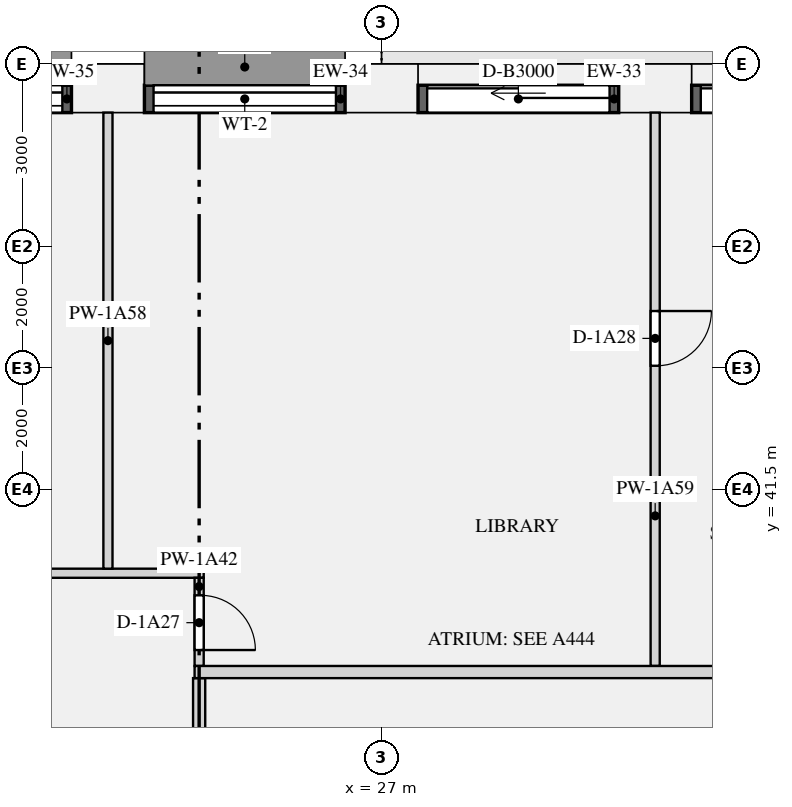
"""IFC4 building model, lengths in metres.
Left out: names, types, materials, properties, quantities, classifications, styles, units other than length and angle.
Written with IfcOpenShell. Run it as: python <this file> out.ifc"""

import sys

from ifc_helpers import new_model, si_unit, direction, frame, frame_2d, origin, origin_2d, place, context, subcontext, project, spatial, rectangle, extrude, element, fill, save


model = new_model("IFC4")
c1 = context("Model", 3, precision=1e-05, world=origin(), true_north=direction((0.0, 1.0)))
c2 = subcontext(c1, "Body", "Model", "MODEL_VIEW")
j1 = project(units=[si_unit("LENGTHUNIT", "METRE"), si_unit("PLANEANGLEUNIT", "RADIAN")], contexts=[c1])
p1 = place(None, origin())
s1 = spatial("IfcSite", under=j1, at=p1, CompositionType="ELEMENT")
p2 = place(p1, origin())
s2 = spatial("IfcBuilding", under=s1, at=p2, CompositionType="ELEMENT")
p3 = place(p2, frame((0.0, 0.0, 19.5)))
s3 = spatial("IfcBuildingStorey", under=s2, at=p3, CompositionType="ELEMENT", Elevation=19.5)
p4 = place(p3, frame((31.5, 48.1, -0.32), z_axis=(0.0, 0.0, 1.0), x_axis=(-1.0, 0.0, 0.0)))
e1 = element("IfcColumn", 1, at=p4, inside=s3, PredefinedType="USERDEFINED", context=c2, shape_type="SweptSolid", body=[
    extrude(rectangle(XDim=1.2, YDim=0.8, at=origin_2d()), origin(), (0.0, 0.0, 1.0), 3.47),
])
p5 = place(p3, frame((27.0, 48.1, 0.0), z_axis=(0.0, 0.0, 1.0), x_axis=(-1.0, 0.0, 0.0)))
e2 = element("IfcColumn", 2, at=p5, inside=s3, PredefinedType="USERDEFINED", context=c2, shape_type="SweptSolid", body=[
    extrude(rectangle(XDim=1.2, YDim=0.8, at=origin_2d()), origin(), (0.0, 0.0, 1.0), 3.15),
])
p6 = place(p3, frame((22.5, 48.1, -0.32), z_axis=(0.0, 0.0, 1.0), x_axis=(-1.0, 0.0, 0.0)))
e3 = element("IfcColumn", 3, at=p6, inside=s3, PredefinedType="USERDEFINED", context=c2, shape_type="SweptSolid", body=[
    extrude(rectangle(XDim=1.2, YDim=0.8, at=origin_2d()), origin(), (0.0, 0.0, 1.0), 3.47),
])
p7 = place(p3, frame((35.4, 47.925, 0.0), z_axis=(0.0, 0.0, 1.0), x_axis=(-1.0, 0.0, 0.0)))
e4 = element("IfcWall", 4, at=p7, inside=s3, PredefinedType="SOLIDWALL", context=c2, shape_type="SweptSolid", body=[
    extrude(rectangle(XDim=3.3, YDim=0.45, at=frame_2d((1.65, 0.0))), origin(), (0.0, 0.0, 1.0), 2.83),
])
p8 = place(p7, frame((0.15, 0.0, 0.0)))
e5 = element("IfcOpeningElement", 5, at=p8, cuts=e4, PredefinedType="OPENING", context=c2, shape_type="SweptSolid", body=[
    extrude(rectangle(XDim=3.0, YDim=2.3, at=frame_2d((1.5, 1.15))), frame((0.0, 0.235, 0.0), z_axis=(0.0, -1.0, 0.0), x_axis=(1.0, 0.0, 0.0)), (0.0, 0.0, 1.0), 0.47),
])
p9 = place(p3, frame((30.9, 47.925, 0.0), z_axis=(0.0, 0.0, 1.0), x_axis=(-1.0, 0.0, 0.0)))
e6 = element("IfcWall", 6, at=p9, inside=s3, PredefinedType="SOLIDWALL", context=c2, shape_type="SweptSolid", body=[
    extrude(rectangle(XDim=3.3, YDim=0.45, at=frame_2d((1.65, 0.0))), origin(), (0.0, 0.0, 1.0), 2.83),
])
p10 = place(p9, frame((0.15, 0.0, 0.0)))
e7 = element("IfcOpeningElement", 7, at=p10, cuts=e6, PredefinedType="OPENING", context=c2, shape_type="SweptSolid", body=[
    extrude(rectangle(XDim=3.0, YDim=2.3, at=frame_2d((1.5, 1.15))), frame((0.0, 0.235, 0.0), z_axis=(0.0, -1.0, 0.0), x_axis=(1.0, 0.0, 0.0)), (0.0, 0.0, 1.0), 0.47),
])
p11 = place(p3, frame((26.4, 47.925, 0.9), z_axis=(0.0, 0.0, 1.0), x_axis=(-1.0, 0.0, 0.0)))
e8 = element("IfcWall", 8, at=p11, inside=s3, PredefinedType="SOLIDWALL", context=c2, shape_type="SweptSolid", body=[
    extrude(rectangle(XDim=3.3, YDim=0.45, at=frame_2d((1.65, 0.0))), origin(), (0.0, 0.0, 1.0), 1.93),
])
p12 = place(p11, frame((0.15, 0.0, 0.15)))
e9 = element("IfcOpeningElement", 9, at=p12, cuts=e8, PredefinedType="OPENING", context=c2, shape_type="SweptSolid", body=[
    extrude(rectangle(XDim=3.0, YDim=1.5, at=frame_2d((1.5, 0.75))), frame((0.0, 0.235, 0.0), z_axis=(0.0, -1.0, 0.0), x_axis=(1.0, 0.0, 0.0)), (0.0, 0.0, 1.0), 0.47),
])
p13 = place(p3, frame((21.9, 47.925, 0.9), z_axis=(0.0, 0.0, 1.0), x_axis=(-1.0, 0.0, 0.0)))
e10 = element("IfcWall", 10, at=p13, inside=s3, PredefinedType="SOLIDWALL", context=c2, shape_type="SweptSolid", body=[
    extrude(rectangle(XDim=3.3, YDim=0.45, at=frame_2d((1.65, 0.0))), origin(), (0.0, 0.0, 1.0), 1.93),
])
p14 = place(p13, frame((0.15, 0.0, 0.15)))
e11 = element("IfcOpeningElement", 11, at=p14, cuts=e10, PredefinedType="OPENING", context=c2, shape_type="SweptSolid", body=[
    extrude(rectangle(XDim=3.0, YDim=1.5, at=frame_2d((1.5, 0.75))), frame((0.0, 0.235, 0.0), z_axis=(0.0, -1.0, 0.0), x_axis=(1.0, 0.0, 0.0)), (0.0, 0.0, 1.0), 0.47),
])
p15 = place(p3, frame((23.925, 38.5, 0.0), z_axis=(0.0, 0.0, 1.0), x_axis=(1.0, 0.0, 0.0)))
e12 = element("IfcWall", 12, at=p15, inside=s3, PredefinedType="PARTITIONING", context=c2, shape_type="SweptSolid", body=[
    extrude(rectangle(XDim=24.15, YDim=0.2, at=frame_2d((12.075, 0.0))), origin(), (0.0, 0.0, 1.0), 2.83),
])
p16 = place(p3, frame((0.8, 40.125, 0.0), z_axis=(0.0, 0.0, 1.0), x_axis=(1.0, 0.0, 0.0)))
e13 = element("IfcWall", 13, at=p16, inside=s3, PredefinedType="PARTITIONING", context=c2, shape_type="SweptSolid", body=[
    extrude(rectangle(XDim=23.275, YDim=0.15, at=frame_2d((11.637, 0.0))), origin(), (0.0, 0.0, 1.0), 2.83),
])
p17 = place(p16, frame((5.5, 0.0, 0.0)))
e14 = element("IfcOpeningElement", 14, at=p17, cuts=e13, PredefinedType="OPENING", context=c2, shape_type="SweptSolid", body=[
    extrude(rectangle(XDim=0.9, YDim=2.1, at=frame_2d((0.45, 1.05))), frame((0.0, 0.085, 0.0), z_axis=(0.0, -1.0, 0.0), x_axis=(1.0, 0.0, 0.0)), (0.0, 0.0, 1.0), 0.17),
])
p18 = place(p16, frame((9.35, 0.0, 0.0)))
e15 = element("IfcOpeningElement", 15, at=p18, cuts=e13, PredefinedType="OPENING", context=c2, shape_type="SweptSolid", body=[
    extrude(rectangle(XDim=0.9, YDim=2.1, at=frame_2d((0.45, 1.05))), frame((0.0, 0.085, 0.0), z_axis=(0.0, -1.0, 0.0), x_axis=(1.0, 0.0, 0.0)), (0.0, 0.0, 1.0), 0.17),
])
p19 = place(p16, frame((19.0, 0.0, 0.0)))
e16 = element("IfcOpeningElement", 16, at=p19, cuts=e13, PredefinedType="OPENING", context=c2, shape_type="SweptSolid", body=[
    extrude(rectangle(XDim=0.9, YDim=2.1, at=frame_2d((0.45, 1.05))), frame((0.0, 0.085, 0.0), z_axis=(0.0, -1.0, 0.0), x_axis=(1.0, 0.0, 0.0)), (0.0, 0.0, 1.0), 0.17),
])
p20 = place(p3, frame((24.0, 38.6, 0.0), z_axis=(0.0, 0.0, 1.0), x_axis=(0.0, 1.0, 0.0)))
e17 = element("IfcWall", 17, at=p20, inside=s3, PredefinedType="PARTITIONING", context=c2, shape_type="SweptSolid", body=[
    extrude(rectangle(XDim=1.45, YDim=0.15, at=frame_2d((0.725, 0.0))), origin(), (0.0, 0.0, 1.0), 2.83),
])
p21 = place(p20, frame((0.262, 0.0, 0.0)))
e18 = element("IfcOpeningElement", 18, at=p21, cuts=e17, PredefinedType="OPENING", context=c2, shape_type="SweptSolid", body=[
    extrude(rectangle(XDim=0.9, YDim=2.1, at=frame_2d((0.45, 1.05))), frame((0.0, 0.085, 0.0), z_axis=(0.0, -1.0, 0.0), x_axis=(1.0, 0.0, 0.0)), (0.0, 0.0, 1.0), 0.17),
])
p22 = place(p3, frame((24.0, 27.1, 0.0), z_axis=(0.0, 0.0, 1.0), x_axis=(0.0, 1.0, 0.0)))
e19 = element("IfcWall", 19, at=p22, inside=s3, PredefinedType="PARTITIONING", context=c2, shape_type="SweptSolid", body=[
    extrude(rectangle(XDim=11.3, YDim=0.2, at=frame_2d((5.65, 0.0))), origin(), (0.0, 0.0, 1.0), 2.83),
])
p23 = place(p22, frame((5.35, 0.0, 0.0)))
e20 = element("IfcOpeningElement", 20, at=p23, cuts=e19, PredefinedType="OPENING", context=c2, shape_type="SweptSolid", body=[
    extrude(rectangle(XDim=1.1, YDim=2.1, at=frame_2d((0.55, 1.05))), frame((0.0, 0.11, 0.0), z_axis=(0.0, -1.0, 0.0), x_axis=(1.0, 0.0, 0.0)), (0.0, 0.0, 1.0), 0.22),
])
p24 = place(p3, frame((22.5, 40.2, 0.0), z_axis=(0.0, 0.0, 1.0), x_axis=(0.0, 1.0, 0.0)))
e21 = element("IfcWall", 21, at=p24, inside=s3, PredefinedType="PARTITIONING", context=c2, shape_type="SweptSolid", body=[
    extrude(rectangle(XDim=7.5, YDim=0.15, at=frame_2d((3.75, 0.0))), origin(), (0.0, 0.0, 1.0), 2.83),
])
p25 = place(p3, frame((31.5, 38.6, 0.0), z_axis=(0.0, 0.0, 1.0), x_axis=(0.0, 1.0, 0.0)))
e22 = element("IfcWall", 22, at=p25, inside=s3, PredefinedType="PARTITIONING", context=c2, shape_type="SweptSolid", body=[
    extrude(rectangle(XDim=9.1, YDim=0.15, at=frame_2d((4.55, 0.0))), origin(), (0.0, 0.0, 1.0), 2.83),
])
p26 = place(p25, frame((4.937, 0.0, 0.0)))
e23 = element("IfcOpeningElement", 23, at=p26, cuts=e22, PredefinedType="OPENING", context=c2, shape_type="SweptSolid", body=[
    extrude(rectangle(XDim=0.9, YDim=2.1, at=frame_2d((0.45, 1.05))), frame((0.0, 0.085, 0.0), z_axis=(0.0, -1.0, 0.0), x_axis=(1.0, 0.0, 0.0)), (0.0, 0.0, 1.0), 0.17),
])
p27 = place(p8, origin())
e24 = element("IfcDoor", 24, at=p27, inside=s3, OperationType="SLIDING_TO_LEFT", PredefinedType="DOOR", context=c2, shape_type="SweptSolid", body=[
    extrude(rectangle(XDim=3.0, YDim=2.3, at=frame_2d((1.5, 1.15))), frame((0.0, -0.07, 0.0), z_axis=(0.0, -1.0, 0.0), x_axis=(1.0, 0.0, 0.0)), (0.0, 0.0, 1.0), 0.05),
])
fill(e5, e24)
p28 = place(p10, origin())
e25 = element("IfcDoor", 25, at=p28, inside=s3, OperationType="SLIDING_TO_LEFT", PredefinedType="DOOR", context=c2, shape_type="SweptSolid", body=[
    extrude(rectangle(XDim=3.0, YDim=2.3, at=frame_2d((1.5, 1.15))), frame((0.0, -0.07, 0.0), z_axis=(0.0, -1.0, 0.0), x_axis=(1.0, 0.0, 0.0)), (0.0, 0.0, 1.0), 0.05),
])
fill(e7, e25)
p29 = place(p12, origin())
e26 = element("IfcWindow", 26, at=p29, inside=s3, PartitioningType="SINGLE_PANEL", PredefinedType="WINDOW", context=c2, shape_type="SweptSolid", body=[
    extrude(rectangle(XDim=3.0, YDim=1.5, at=frame_2d((1.5, 0.75))), frame((0.0, -0.065, 0.0), z_axis=(0.0, -1.0, 0.0), x_axis=(1.0, 0.0, 0.0)), (0.0, 0.0, 1.0), 0.06),
])
fill(e9, e26)
p30 = place(p14, origin())
e27 = element("IfcWindow", 27, at=p30, inside=s3, PartitioningType="SINGLE_PANEL", PredefinedType="WINDOW", context=c2, shape_type="SweptSolid", body=[
    extrude(rectangle(XDim=3.0, YDim=1.5, at=frame_2d((1.5, 0.75))), frame((0.0, -0.065, 0.0), z_axis=(0.0, -1.0, 0.0), x_axis=(1.0, 0.0, 0.0)), (0.0, 0.0, 1.0), 0.06),
])
fill(e11, e27)
p31 = place(p21, frame((0.9, 0.0, 0.0), z_axis=(0.0, 0.0, 1.0), x_axis=(-1.0, 0.0, 0.0)))
e28 = element("IfcDoor", 28, at=p31, inside=s3, OperationType="SINGLE_SWING_RIGHT", PredefinedType="DOOR", context=c2, shape_type="SweptSolid", body=[
    extrude(rectangle(XDim=0.9, YDim=2.1, at=frame_2d((0.45, 1.05))), frame((0.0, 0.025, 0.0), z_axis=(0.0, -1.0, 0.0), x_axis=(1.0, 0.0, 0.0)), (0.0, 0.0, 1.0), 0.05),
])
fill(e18, e28)
p32 = place(p26, frame((0.9, 0.0, 0.0), z_axis=(0.0, 0.0, 1.0), x_axis=(-1.0, 0.0, 0.0)))
e29 = element("IfcDoor", 29, at=p32, inside=s3, OperationType="SINGLE_SWING_LEFT", PredefinedType="DOOR", context=c2, shape_type="SweptSolid", body=[
    extrude(rectangle(XDim=0.9, YDim=2.1, at=frame_2d((0.45, 1.05))), frame((0.0, 0.025, 0.0), z_axis=(0.0, -1.0, 0.0), x_axis=(1.0, 0.0, 0.0)), (0.0, 0.0, 1.0), 0.05),
])
fill(e23, e29)
save(model, sys.argv[1])
